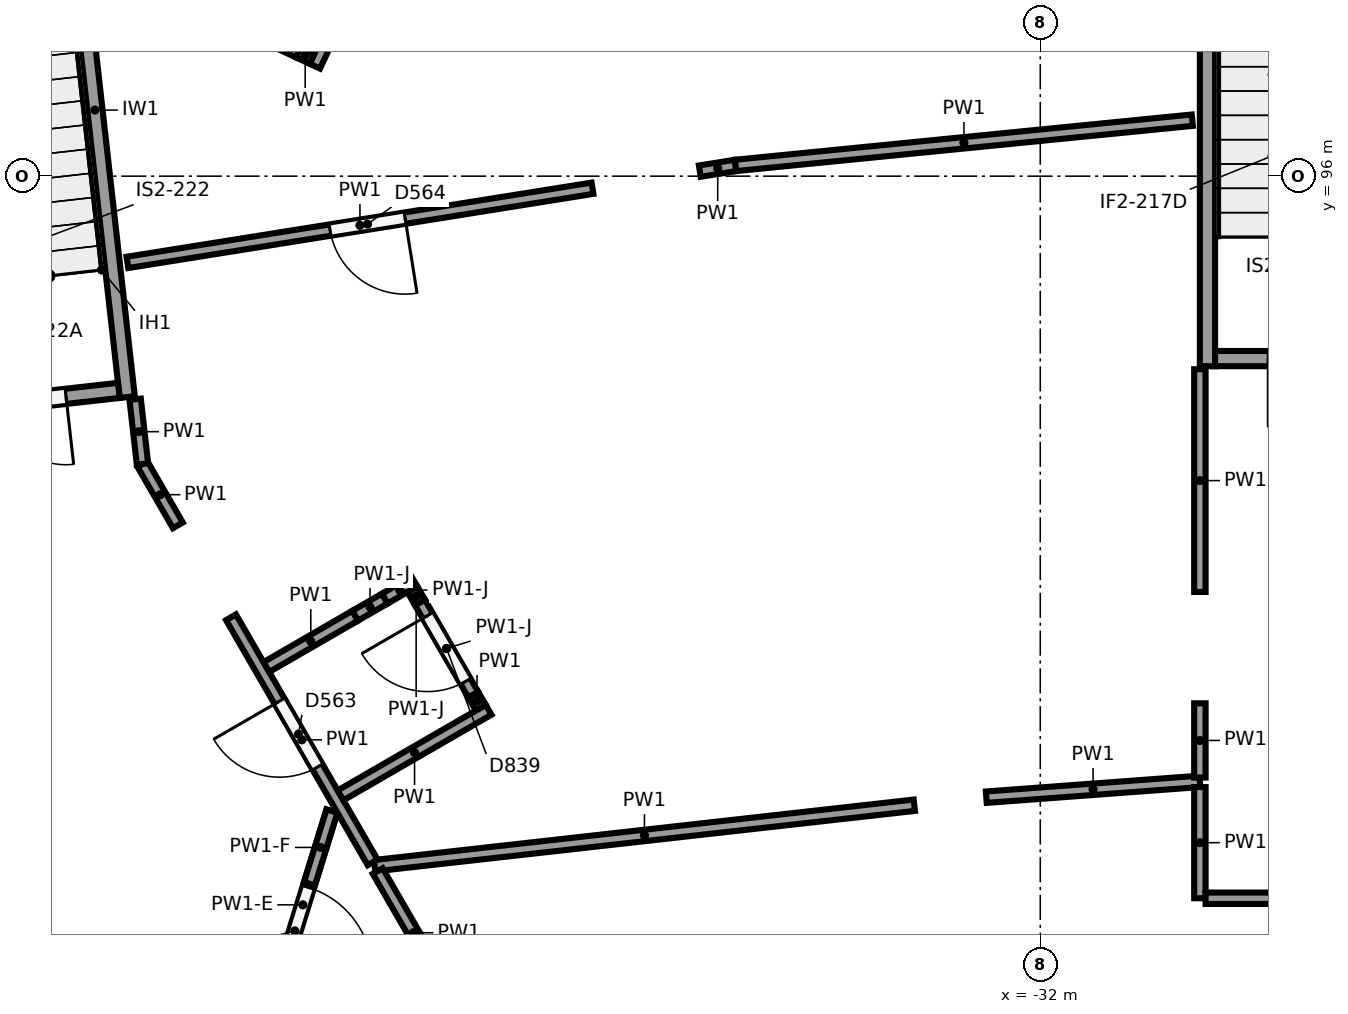
"""IFC4 building model, lengths in metres.
Left out: names, types, materials, properties, quantities, classifications, styles, units other than length and angle.
Written with IfcOpenShell. Run it as: python <this file> out.ifc"""

import sys

from ifc_helpers import new_model, si_unit, direction, frame, frame_2d, origin, origin_2d, place, context, subcontext, project, spatial, rectangle, circle, extrude, element, fill, save


model = new_model("IFC4")
c1 = context("Model", 3, precision=1e-05, world=origin(), true_north=direction((0.0, 1.0)))
c2 = subcontext(c1, "Body", "Model", "MODEL_VIEW")
j1 = project(units=[si_unit("LENGTHUNIT", "METRE"), si_unit("PLANEANGLEUNIT", "RADIAN")], contexts=[c1])
p1 = place(None, origin())
s1 = spatial("IfcSite", under=j1, at=p1, CompositionType="ELEMENT")
p2 = place(p1, origin())
s2 = spatial("IfcBuilding", under=s1, at=p2, CompositionType="ELEMENT")
p3 = place(p2, origin())
s3 = spatial("IfcBuildingStorey", under=s2, at=p3, CompositionType="ELEMENT", Elevation=0.0)
p4 = place(p3, frame((-34.531, 89.912, 0.0), z_axis=(0.0, 0.0, 1.0), x_axis=(1.0, 0.0, 0.0)))
e1 = element("IfcColumn", 1, at=p4, inside=s3, PredefinedType="COLUMN", context=c2, shape_type="SweptSolid", body=[
    extrude(circle(Radius=0.45, at=origin_2d()), origin(), (0.0, 0.0, 1.0), 6.5),
])
p5 = place(p3, frame((-44.683, 91.091, 0.0), z_axis=(0.0, 0.0, 1.0), x_axis=(1.0, 0.0, 0.0)))
e2 = element("IfcColumn", 2, at=p5, inside=s3, PredefinedType="COLUMN", context=c2, shape_type="SweptSolid", body=[
    extrude(circle(Radius=0.55, at=origin_2d()), origin(), (0.0, 0.0, 1.0), 6.5),
])
p6 = place(p3, frame((-29.8, 102.3, 0.0), z_axis=(0.0, 0.0, 1.0), x_axis=(0.0, -1.0, 0.0)))
e3 = element("IfcWall", 3, at=p6, inside=s3, PredefinedType="SHEAR", context=c2, shape_type="SweptSolid", body=[
    extrude(rectangle(XDim=8.8, YDim=0.2, at=frame_2d((4.4, 0.0))), origin(), (0.0, 0.0, 1.0), 6.15),
])
p7 = place(p3, frame((-26.5, 93.6, 0.0), z_axis=(0.0, 0.0, 1.0), x_axis=(-1.0, 0.0, 0.0)))
e4 = element("IfcWall", 4, at=p7, inside=s3, PredefinedType="SHEAR", context=c2, shape_type="SweptSolid", body=[
    extrude(rectangle(XDim=3.2, YDim=0.2, at=frame_2d((1.6, 0.0))), origin(), (0.0, 0.0, 1.0), 6.15),
])
p8 = place(p7, frame((0.7, 0.0, 0.0)))
e5 = element("IfcOpeningElement", 5, at=p8, cuts=e4, PredefinedType="OPENING", context=c2, shape_type="SweptSolid", body=[
    extrude(rectangle(XDim=1.8, YDim=2.1, at=frame_2d((0.9, 1.05))), frame((0.0, 0.11, 0.0), z_axis=(0.0, -1.0, 0.0), x_axis=(1.0, 0.0, 0.0)), (0.0, 0.0, 1.0), 0.22),
])
p9 = place(p3, frame((-44.863, 100.646, 0.0), z_axis=(0.0, 0.0, 1.0), x_axis=(0.111951003472, -0.993713727802, 0.0)))
e6 = element("IfcWall", 6, at=p9, inside=s3, PredefinedType="SHEAR", context=c2, shape_type="SweptSolid", body=[
    extrude(rectangle(XDim=7.6, YDim=0.2, at=frame_2d((3.8, 0.0))), origin(), (0.0, 0.0, 1.0), 6.15),
])
p10 = place(p3, frame((-44.123, 93.182, 0.0), z_axis=(0.0, 0.0, 1.0), x_axis=(-0.993717005286, -0.11192190762, 0.0)))
e7 = element("IfcWall", 7, at=p10, inside=s3, PredefinedType="SHEAR", context=c2, shape_type="SweptSolid", body=[
    extrude(rectangle(XDim=3.2, YDim=0.2, at=frame_2d((1.6, 0.0))), origin(), (0.0, 0.0, 1.0), 6.15),
])
p11 = place(p10, frame((0.7, 0.0, 0.0)))
e8 = element("IfcOpeningElement", 8, at=p11, cuts=e7, PredefinedType="OPENING", context=c2, shape_type="SweptSolid", body=[
    extrude(rectangle(XDim=1.8, YDim=2.1, at=frame_2d((0.9, 1.05))), frame((0.0, 0.11, 0.0), z_axis=(0.0, -1.0, 0.0), x_axis=(1.0, 0.0, 0.0)), (0.0, 0.0, 1.0), 0.22),
])
p12 = place(p3, frame((-40.758, 86.929, 0.0), z_axis=(0.0, 0.0, 1.0), x_axis=(0.993792986052, 0.111245228541, 0.0)))
e9 = element("IfcWall", 9, at=p12, inside=s3, PredefinedType="PARTITIONING", context=c2, shape_type="SweptSolid", body=[
    extrude(rectangle(XDim=7.146, YDim=0.15, at=frame_2d((3.573, 0.0))), origin(), (0.0, 0.0, 1.0), 6.15),
])
p13 = place(p3, frame((-32.71, 87.83, 0.0), z_axis=(0.0, 0.0, 1.0), x_axis=(0.997265626559, 0.07390040652, 0.0)))
e10 = element("IfcWall", 10, at=p13, inside=s3, PredefinedType="PARTITIONING", context=c2, shape_type="SweptSolid", body=[
    extrude(rectangle(XDim=2.818, YDim=0.15, at=frame_2d((1.409, 0.0))), origin(), (0.0, 0.0, 1.0), 6.15),
])
p14 = place(p3, frame((-29.9, 87.963, 0.0), z_axis=(0.0, 0.0, 1.0), x_axis=(0.0, -1.0, 0.0)))
e11 = element("IfcWall", 11, at=p14, inside=s3, PredefinedType="PARTITIONING", context=c2, shape_type="SweptSolid", body=[
    extrude(rectangle(XDim=1.463, YDim=0.15, at=frame_2d((0.731, 0.0))), origin(), (0.0, 0.0, 1.0), 6.15),
])
p15 = place(p3, frame((-29.825, 86.5, 0.0), z_axis=(0.0, 0.0, 1.0), x_axis=(1.0, 0.0, 0.0)))
e12 = element("IfcWall", 12, at=p15, inside=s3, PredefinedType="PARTITIONING", context=c2, shape_type="SweptSolid", body=[
    extrude(rectangle(XDim=8.254, YDim=0.15, at=frame_2d((4.127, 0.0))), origin(), (0.0, 0.0, 1.0), 6.15),
])
p16 = place(p3, frame((-39.779, 85.235, 0.0), z_axis=(0.0, 0.0, 1.0), x_axis=(-0.500425153996, 0.865779801825, 0.0)))
e13 = element("IfcWall", 13, at=p16, inside=s3, PredefinedType="PARTITIONING", context=c2, shape_type="SweptSolid", body=[
    extrude(rectangle(XDim=1.874, YDim=0.15, at=frame_2d((0.937, 0.0))), origin(), (0.0, 0.0, 1.0), 6.15),
])
p17 = place(p3, frame((-37.891, 95.841, 0.0), z_axis=(0.0, 0.0, 1.0), x_axis=(-0.987522859615, -0.157475717929, 0.0)))
e14 = element("IfcWall", 14, at=p17, inside=s3, PredefinedType="PARTITIONING", context=c2, shape_type="SweptSolid", body=[
    extrude(rectangle(XDim=6.197, YDim=0.15, at=frame_2d((3.098, 0.0))), origin(), (0.0, 0.0, 1.0), 6.15),
])
p18 = place(p17, frame((2.497, 0.0, 0.0)))
e15 = element("IfcOpeningElement", 15, at=p18, cuts=e14, PredefinedType="OPENING", context=c2, shape_type="SweptSolid", body=[
    extrude(rectangle(XDim=1.0, YDim=2.1, at=frame_2d((0.5, 1.05))), frame((0.0, 0.085, 0.0), z_axis=(0.0, -1.0, 0.0), x_axis=(1.0, 0.0, 0.0)), (0.0, 0.0, 1.0), 0.17),
])
p19 = place(p3, frame((-36.479, 96.066, 0.0), z_axis=(0.0, 0.0, 1.0), x_axis=(0.987478956235, 0.157750787614, 0.0)))
e16 = element("IfcWall", 16, at=p19, inside=s3, PredefinedType="PARTITIONING", context=c2, shape_type="SweptSolid", body=[
    extrude(rectangle(XDim=0.477, YDim=0.15, at=frame_2d((0.238, 0.0))), origin(), (0.0, 0.0, 1.0), 6.15),
])
p20 = place(p3, frame((-36.009, 96.141, 0.0), z_axis=(0.0, 0.0, 1.0), x_axis=(0.995133204742, 0.098538849293, 0.0)))
e17 = element("IfcWall", 17, at=p20, inside=s3, PredefinedType="PARTITIONING", context=c2, shape_type="SweptSolid", body=[
    extrude(rectangle(XDim=6.038, YDim=0.15, at=frame_2d((3.019, 0.0))), origin(), (0.0, 0.0, 1.0), 6.15),
])
p21 = place(p3, frame((-40.783, 86.972, 0.0), z_axis=(0.0, 0.0, 1.0), x_axis=(-0.50040316576, 0.865792510765, 0.0)))
e18 = element("IfcWall", 18, at=p21, inside=s3, PredefinedType="PARTITIONING", context=c2, shape_type="SweptSolid", body=[
    extrude(rectangle(XDim=3.725, YDim=0.15, at=frame_2d((1.863, 0.0))), origin(), (0.0, 0.0, 1.0), 6.15),
])
p22 = place(p21, frame((1.45, 0.0, 0.0)))
e19 = element("IfcOpeningElement", 19, at=p22, cuts=e18, PredefinedType="OPENING", context=c2, shape_type="SweptSolid", body=[
    extrude(rectangle(XDim=1.0, YDim=2.1, at=frame_2d((0.5, 1.05))), frame((0.0, 0.085, 0.0), z_axis=(0.0, -1.0, 0.0), x_axis=(1.0, 0.0, 0.0)), (0.0, 0.0, 1.0), 0.17),
])
p23 = place(p3, frame((-43.346, 91.406, 0.0), z_axis=(0.0, 0.0, 1.0), x_axis=(-0.500395505551, 0.865796938101, 0.0)))
e20 = element("IfcWall", 20, at=p23, inside=s3, PredefinedType="PARTITIONING", context=c2, shape_type="SweptSolid", body=[
    extrude(rectangle(XDim=0.931, YDim=0.15, at=frame_2d((0.466, 0.0))), origin(), (0.0, 0.0, 1.0), 6.15),
])
p24 = place(p3, frame((-43.812, 92.212, 0.0), z_axis=(0.0, 0.0, 1.0), x_axis=(-0.112117924941, 0.993694908363, 0.0)))
e21 = element("IfcWall", 21, at=p24, inside=s3, PredefinedType="PARTITIONING", context=c2, shape_type="SweptSolid", body=[
    extrude(rectangle(XDim=0.858, YDim=0.15, at=frame_2d((0.429, 0.0))), origin(), (0.0, 0.0, 1.0), 6.15),
])
p25 = place(p3, frame((-29.9, 93.46, 0.0), z_axis=(0.0, 0.0, 1.0), x_axis=(0.0, -1.0, 0.0)))
e22 = element("IfcWall", 22, at=p25, inside=s3, PredefinedType="PARTITIONING", context=c2, shape_type="SweptSolid", body=[
    extrude(rectangle(XDim=2.93, YDim=0.15, at=frame_2d((1.465, 0.0))), origin(), (0.0, 0.0, 1.0), 6.15),
])
p26 = place(p3, frame((-29.9, 89.064, 0.0), z_axis=(0.0, 0.0, 1.0), x_axis=(0.0, -1.0, 0.0)))
e23 = element("IfcWall", 23, at=p26, inside=s3, PredefinedType="PARTITIONING", context=c2, shape_type="SweptSolid", body=[
    extrude(rectangle(XDim=0.977, YDim=0.15, at=frame_2d((0.488, 0.0))), origin(), (0.0, 0.0, 1.0), 6.15),
])
p27 = place(p3, frame((-41.206, 87.854, 0.0), z_axis=(0.0, 0.0, 1.0), x_axis=(0.865775232905, 0.500433058548, 0.0)))
e24 = element("IfcWall", 24, at=p27, inside=s3, PredefinedType="PARTITIONING", context=c2, shape_type="SweptSolid", body=[
    extrude(rectangle(XDim=2.25, YDim=0.15, at=frame_2d((1.125, 0.0))), origin(), (0.0, 0.0, 1.0), 6.15),
])
p28 = place(p3, frame((-42.182, 89.542, 0.0), z_axis=(0.0, 0.0, 1.0), x_axis=(0.865772787536, 0.50043728914, 0.0)))
e25 = element("IfcWall", 25, at=p28, inside=s3, PredefinedType="PARTITIONING", context=c2, shape_type="SweptSolid", body=[
    extrude(rectangle(XDim=1.35, YDim=0.15, at=frame_2d((0.675, 0.0))), origin(), (0.0, 0.0, 1.0), 6.15),
])
p29 = place(p3, frame((-41.013, 90.217, 0.0), z_axis=(0.0, 0.0, 1.0), x_axis=(0.865896406789, 0.500223362819, 0.0)))
e26 = element("IfcWall", 26, at=p29, inside=s3, PredefinedType="PARTITIONING", context=c2, shape_type="SweptSolid", body=[
    extrude(rectangle(XDim=0.45, YDim=0.15, at=frame_2d((0.225, 0.0))), origin(), (0.0, 0.0, 1.0), 5.05),
])
p30 = place(p3, frame((-40.624, 90.442, 0.0), z_axis=(0.0, 0.0, 1.0), x_axis=(0.865661377728, 0.500629982232, 0.0)))
e27 = element("IfcWall", 27, at=p30, inside=s3, PredefinedType="PARTITIONING", context=c2, shape_type="SweptSolid", body=[
    extrude(rectangle(XDim=0.45, YDim=0.15, at=frame_2d((0.225, 0.0))), origin(), (0.0, 0.0, 1.0), 5.05),
])
p31 = place(p3, frame((-39.361, 89.007, 0.0), z_axis=(0.0, 0.0, 1.0), x_axis=(-0.500603037456, 0.865676959893, 0.0)))
e28 = element("IfcWall", 28, at=p31, inside=s3, PredefinedType="PARTITIONING", context=c2, shape_type="SweptSolid", body=[
    extrude(rectangle(XDim=0.2, YDim=0.15, at=frame_2d((0.1, 0.0))), origin(), (0.0, 0.0, 1.0), 6.15),
])
p32 = place(p3, frame((-39.461, 89.18, 0.0), z_axis=(0.0, 0.0, 1.0), x_axis=(-0.500451896662, 0.865764343876, 0.0)))
e29 = element("IfcWall", 29, at=p32, inside=s3, PredefinedType="PARTITIONING", context=c2, shape_type="SweptSolid", body=[
    extrude(rectangle(XDim=1.4, YDim=0.15, at=frame_2d((0.7, 0.0))), origin(), (0.0, 0.0, 1.0), 5.05),
])
p33 = place(p32, frame((0.2, 0.0, 0.0)))
e30 = element("IfcOpeningElement", 30, at=p33, cuts=e29, PredefinedType="OPENING", context=c2, shape_type="SweptSolid", body=[
    extrude(rectangle(XDim=1.0, YDim=2.1, at=frame_2d((0.5, 1.05))), frame((0.0, 0.085, 0.0), z_axis=(0.0, -1.0, 0.0), x_axis=(1.0, 0.0, 0.0)), (0.0, 0.0, 1.0), 0.17),
])
p34 = place(p3, frame((-40.162, 90.392, 0.0), z_axis=(0.0, 0.0, 1.0), x_axis=(-0.500603037456, 0.865676959893, 0.0)))
e31 = element("IfcWall", 31, at=p34, inside=s3, PredefinedType="PARTITIONING", context=c2, shape_type="SweptSolid", body=[
    extrude(rectangle(XDim=0.2, YDim=0.15, at=frame_2d((0.1, 0.0))), origin(), (0.0, 0.0, 1.0), 5.05),
])
p35 = place(p3, frame((-40.785, 99.079, 0.0), z_axis=(0.0, 0.0, 1.0), x_axis=(-0.421697036053, -0.906736791899, 0.0)))
e32 = element("IfcWall", 32, at=p35, inside=s3, PredefinedType="PARTITIONING", context=c2, shape_type="SweptSolid", body=[
    extrude(rectangle(XDim=1.8, YDim=0.15, at=frame_2d((0.9, 0.0))), origin(), (0.0, 0.0, 1.0), 6.15),
])
p36 = place(p3, frame((-43.757, 98.559, 0.0), z_axis=(0.0, 0.0, 1.0), x_axis=(0.906698414225, -0.421779546258, 0.0)))
e33 = element("IfcWall", 33, at=p36, inside=s3, PredefinedType="PARTITIONING", context=c2, shape_type="SweptSolid", body=[
    extrude(rectangle(XDim=2.2, YDim=0.15, at=frame_2d((1.1, 0.0))), origin(), (0.0, 0.0, 1.0), 6.15),
])
p37 = place(p36, frame((0.2, 0.0, 0.0)))
e34 = element("IfcOpeningElement", 34, at=p37, cuts=e33, PredefinedType="OPENING", context=c2, shape_type="SweptSolid", body=[
    extrude(rectangle(XDim=1.0, YDim=2.1, at=frame_2d((0.5, 1.05))), frame((0.0, 0.085, 0.0), z_axis=(0.0, -1.0, 0.0), x_axis=(1.0, 0.0, 0.0)), (0.0, 0.0, 1.0), 0.17),
])
p38 = place(p3, frame((-41.762, 97.631, 0.0), z_axis=(0.0, 0.0, 1.0), x_axis=(0.906775442705, -0.421613918778, 0.0)))
e35 = element("IfcWall", 35, at=p38, inside=s3, PredefinedType="PARTITIONING", context=c2, shape_type="SweptSolid", body=[
    extrude(rectangle(XDim=0.2, YDim=0.15, at=frame_2d((0.1, 0.0))), origin(), (0.0, 0.0, 1.0), 6.15),
])
p39 = place(p3, frame((-41.32, 87.646, 0.0), z_axis=(0.0, 0.0, 1.0), x_axis=(-0.295926199313, -0.955210806346, 0.0)))
e36 = element("IfcWall", 36, at=p39, inside=s3, PredefinedType="PARTITIONING", context=c2, shape_type="SweptSolid", body=[
    extrude(rectangle(XDim=2.582, YDim=0.15, at=frame_2d((1.291, 0.0))), origin(), (0.0, 0.0, 1.0), 5.25),
])
p40 = place(p39, frame((1.05, 0.0, 0.0)))
e37 = element("IfcOpeningElement", 37, at=p40, cuts=e36, PredefinedType="OPENING", context=c2, shape_type="SweptSolid", body=[
    extrude(rectangle(XDim=1.2, YDim=2.1, at=frame_2d((0.6, 1.05))), frame((0.0, 0.085, 0.0), z_axis=(0.0, -1.0, 0.0), x_axis=(1.0, 0.0, 0.0)), (0.0, 0.0, 1.0), 0.17),
])
p41 = place(p3, frame((-41.32, 87.646, 5.25), z_axis=(0.0, 0.0, 1.0), x_axis=(-0.295938375574, -0.955207034031, 0.0)))
e38 = element("IfcWall", 38, at=p41, inside=s3, PredefinedType="PARTITIONING", context=c2, shape_type="SweptSolid", body=[
    extrude(rectangle(XDim=1.0, YDim=0.15, at=frame_2d((0.5, 0.0))), origin(), (0.0, 0.0, 1.0), 0.9),
])
p42 = place(p11, origin())
e39 = element("IfcDoor", 39, at=p42, inside=s3, OperationType="DOUBLE_DOOR_SINGLE_SWING", PredefinedType="DOOR", context=c2, shape_type="SweptSolid", body=[
    extrude(rectangle(XDim=1.8, YDim=2.1, at=frame_2d((0.9, 1.05))), frame((0.0, 0.025, 0.0), z_axis=(0.0, -1.0, 0.0), x_axis=(1.0, 0.0, 0.0)), (0.0, 0.0, 1.0), 0.05),
])
fill(e8, e39)
p43 = place(p18, origin())
e40 = element("IfcDoor", 40, at=p43, inside=s3, OperationType="SINGLE_SWING_LEFT", PredefinedType="DOOR", context=c2, shape_type="SweptSolid", body=[
    extrude(rectangle(XDim=1.0, YDim=2.1, at=frame_2d((0.5, 1.05))), frame((0.0, 0.025, 0.0), z_axis=(0.0, -1.0, 0.0), x_axis=(1.0, 0.0, 0.0)), (0.0, 0.0, 1.0), 0.05),
])
fill(e15, e40)
p44 = place(p22, origin())
e41 = element("IfcDoor", 41, at=p44, inside=s3, OperationType="SINGLE_SWING_RIGHT", PredefinedType="DOOR", context=c2, shape_type="SweptSolid", body=[
    extrude(rectangle(XDim=1.0, YDim=2.1, at=frame_2d((0.5, 1.05))), frame((0.0, 0.025, 0.0), z_axis=(0.0, -1.0, 0.0), x_axis=(1.0, 0.0, 0.0)), (0.0, 0.0, 1.0), 0.05),
])
fill(e19, e41)
p45 = place(p33, origin())
e42 = element("IfcDoor", 42, at=p45, inside=s3, OperationType="SINGLE_SWING_RIGHT", PredefinedType="DOOR", context=c2, shape_type="SweptSolid", body=[
    extrude(rectangle(XDim=1.0, YDim=2.1, at=frame_2d((0.5, 1.05))), frame((0.0, 0.025, 0.0), z_axis=(0.0, -1.0, 0.0), x_axis=(1.0, 0.0, 0.0)), (0.0, 0.0, 1.0), 0.05),
])
fill(e30, e42)
p46 = place(p40, origin())
e43 = element("IfcDoor", 43, at=p46, inside=s3, OperationType="SINGLE_SWING_RIGHT", PredefinedType="DOOR", context=c2, shape_type="SweptSolid", body=[
    extrude(rectangle(XDim=1.2, YDim=2.1, at=frame_2d((0.6, 1.05))), frame((0.0, 0.025, 0.0), z_axis=(0.0, -1.0, 0.0), x_axis=(1.0, 0.0, 0.0)), (0.0, 0.0, 1.0), 0.05),
])
fill(e37, e43)
save(model, sys.argv[1])
